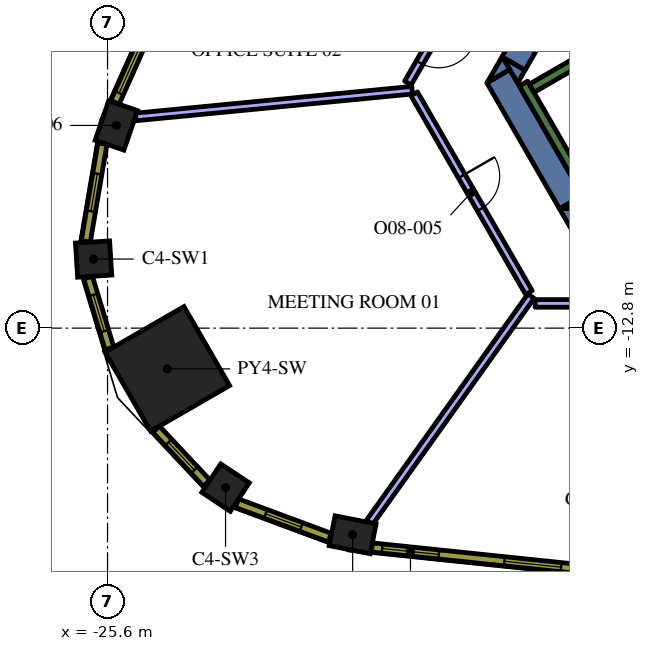
"""IFC4 building model, lengths in metres.
Left out: names, types, materials, properties, quantities, classifications, styles, units other than length and angle.
Written with IfcOpenShell. Run it as: python <this file> out.ifc"""

import sys

from ifc_helpers import new_model, si_unit, direction, frame, frame_2d, origin, origin_2d, place, context, subcontext, project, spatial, polyline, rectangle, outline, extrude, element, fill, save


model = new_model("IFC4")
c1 = context("Model", 3, precision=1e-05, world=origin(), true_north=direction((0.0, 1.0)))
c2 = subcontext(c1, "Body", "Model", "MODEL_VIEW")
j1 = project(units=[si_unit("LENGTHUNIT", "METRE"), si_unit("PLANEANGLEUNIT", "RADIAN")], contexts=[c1])
p1 = place(None, origin())
s1 = spatial("IfcSite", under=j1, at=p1, CompositionType="ELEMENT")
p2 = place(p1, origin())
s2 = spatial("IfcBuilding", under=s1, at=p2, CompositionType="ELEMENT")
p3 = place(p2, frame((0.0, 0.0, 235.2)))
s3 = spatial("IfcBuildingStorey", under=s2, at=p3, CompositionType="ELEMENT", Elevation=235.2)
p4 = place(p3, frame((-24.027, -13.872, 0.0), z_axis=(0.0, 0.0, 1.0), x_axis=(-0.866025403784, -0.5, 0.0)))
e1 = element("IfcColumn", 1, at=p4, inside=s3, PredefinedType="COLUMN", context=c2, shape_type="SweptSolid", body=[
    extrude(rectangle(XDim=2.4, YDim=2.4, at=origin_2d()), origin(), (0.0, 0.0, 1.0), 4.2),
])
for number, where, z_axis, x_axis in (
    (2, (-19.15, -18.237, 0.0), (0.0, 0.0, 1.0), (0.981, -0.192, 0.0)),
    (3, (-25.369, -7.466, 0.0), (0.0, 0.0, 1.0), (-0.324, -0.946, 0.0)),
):
    element("IfcColumn", number, at=place(p3, frame(where, z_axis=z_axis, x_axis=x_axis)), inside=s3, PredefinedType="COLUMN", context=c2, shape_type="SweptSolid", body=[
        extrude(rectangle(XDim=1.1, YDim=0.8, at=origin_2d()), origin(), (0.0, 0.0, 1.0), 4.2),
    ])
for number, where, z_axis, x_axis in (
    (4, (-25.967, -10.982, 0.0), (0.0, 0.0, 1.0), (0.062, -0.998, 0.0)),
    (5, (-22.494, -16.997, 0.0), (0.0, 0.0, 1.0), (0.833, -0.553, 0.0)),
):
    element("IfcColumn", number, at=place(p3, frame(where, z_axis=z_axis, x_axis=x_axis)), inside=s3, PredefinedType="COLUMN", context=c2, shape_type="SweptSolid", body=[
        extrude(rectangle(XDim=0.9, YDim=0.9, at=origin_2d()), origin(), (0.0, 0.0, 1.0), 4.2),
    ])
p5 = place(p3, origin())
e6 = element("IfcWall", 6, at=p5, inside=s3, PredefinedType="SOLIDWALL", context=c2, shape_type="SweptSolid", body=[
    extrude(outline(polyline([(-13.712, -9.65), (-13.324, -9.65), (-13.324, -10.322), (-13.712, -9.65)])), origin(), (0.0, 0.0, 1.0), 4.2),
])
p6 = place(p3, frame((-13.402, -9.487, 0.0), z_axis=(0.0, 0.0, 1.0), x_axis=(-0.500020498207, 0.866013568815, 0.0)))
e7 = element("IfcWall", 7, at=p6, inside=s3, PredefinedType="SOLIDWALL", context=c2, shape_type="SweptSolid", body=[
    extrude(rectangle(XDim=3.829, YDim=0.7, at=frame_2d((1.915, 0.0))), origin(), (0.0, 0.0, 1.0), 4.2),
])
e8 = element("IfcWall", 8, at=p5, inside=s3, PredefinedType="SOLIDWALL", context=c2, shape_type="SweptSolid", body=[
    extrude(outline(polyline([(-15.014, -5.995), (-15.611, -6.339), (-15.213, -5.65), (-15.014, -5.995)])), origin(), (0.0, 0.0, 1.0), 4.2),
])
e9 = element("IfcWall", 9, at=p5, inside=s3, PredefinedType="SOLIDWALL", context=c2, shape_type="SweptSolid", body=[
    extrude(outline(polyline([(-12.904, -9.65), (-13.68, -9.65), (-13.098, -9.314), (-12.904, -9.65)])), origin(), (0.0, 0.0, 1.0), 4.2),
])
p7 = place(p3, frame((-13.475, -3.339, 0.0), z_axis=(0.0, 0.0, 1.0), x_axis=(-0.499944726303, -0.866057313716, 0.0)))
e10 = element("IfcWall", 10, at=p7, inside=s3, PredefinedType="SOLIDWALL", context=c2, shape_type="SweptSolid", body=[
    extrude(rectangle(XDim=2.884, YDim=0.7, at=frame_2d((1.442, 0.0))), origin(), (0.0, 0.0, 1.0), 4.2),
])
e11 = element("IfcWall", 11, at=p5, inside=s3, PredefinedType="SOLIDWALL", context=c2, shape_type="SweptSolid", body=[
    extrude(outline(polyline([(-14.809, -6.35), (-15.197, -5.678), (-14.615, -6.014), (-14.809, -6.35)])), origin(), (0.0, 0.0, 1.0), 4.2),
])
p8 = place(p3, frame((-12.84, -9.511, 0.0), z_axis=(0.0, 0.0, 1.0), x_axis=(-0.499997733992, 0.866026712061, 0.0)))
e12 = element("IfcWall", 12, at=p8, inside=s3, PredefinedType="SOLIDWALL", context=c2, shape_type="SweptSolid", body=[
    extrude(rectangle(XDim=3.634, YDim=0.25, at=frame_2d((1.817, 0.0))), origin(), (0.0, 0.0, 1.0), 4.2),
])
p9 = place(p3, frame((-14.44, -6.49, 0.0), z_axis=(0.0, 0.0, 1.0), x_axis=(0.866022966069, 0.500004222222, 0.0)))
e13 = element("IfcWall", 13, at=p9, inside=s3, PredefinedType="SOLIDWALL", context=c2, shape_type="SweptSolid", body=[
    extrude(rectangle(XDim=6.8, YDim=0.25, at=frame_2d((3.4, 0.0))), origin(), (0.0, 0.0, 1.0), 4.2),
])
p10 = place(p3, frame((-17.586, -6.54, 0.0), z_axis=(0.0, 0.0, 1.0), x_axis=(-0.995357542522, -0.096246363795, 0.0)))
e14 = element("IfcWall", 14, at=p10, inside=s3, PredefinedType="PARTITIONING", context=c2, shape_type="SweptSolid", body=[
    extrude(rectangle(XDim=7.318, YDim=0.2, at=frame_2d((3.659, 0.0))), origin(), (0.0, 0.0, 1.0), 3.45),
])
p11 = place(p3, frame((-16.537, -4.343, 0.0), z_axis=(0.0, 0.0, 1.0), x_axis=(-0.500014285048, -0.866017156151, 0.0)))
e15 = element("IfcWall", 15, at=p11, inside=s3, PredefinedType="PARTITIONING", context=c2, shape_type="SweptSolid", body=[
    extrude(rectangle(XDim=2.317, YDim=0.2, at=frame_2d((1.159, 0.0))), origin(), (0.0, 0.0, 1.0), 3.45),
])
p12 = place(p11, frame((0.7, 0.0, 0.0)))
e16 = element("IfcOpeningElement", 16, at=p12, cuts=e15, PredefinedType="OPENING", context=c2, shape_type="SweptSolid", body=[
    extrude(rectangle(XDim=1.0, YDim=2.1, at=frame_2d((0.5, 1.05))), frame((0.0, 0.11, 0.0), z_axis=(0.0, -1.0, 0.0), x_axis=(1.0, 0.0, 0.0)), (0.0, 0.0, 1.0), 0.22),
])
p13 = place(p3, frame((-14.457, -11.96, 0.0), z_axis=(0.0, 0.0, 1.0), x_axis=(-0.581023578026, -0.813886725397, 0.0)))
e17 = element("IfcWall", 17, at=p13, inside=s3, PredefinedType="PARTITIONING", context=c2, shape_type="SweptSolid", body=[
    extrude(rectangle(XDim=7.318, YDim=0.2, at=frame_2d((3.659, 0.0))), origin(), (0.0, 0.0, 1.0), 3.45),
])
p14 = place(p3, frame((-17.531, -6.635, 0.0), z_axis=(0.0, 0.0, 1.0), x_axis=(0.500009459589, -0.866019942219, 0.0)))
e18 = element("IfcWall", 18, at=p14, inside=s3, PredefinedType="PARTITIONING", context=c2, shape_type="SweptSolid", body=[
    extrude(rectangle(XDim=6.038, YDim=0.2, at=frame_2d((3.019, 0.0))), origin(), (0.0, 0.0, 1.0), 3.45),
])
p15 = place(p14, frame((2.5, 0.0, 0.0)))
e19 = element("IfcOpeningElement", 19, at=p15, cuts=e18, PredefinedType="OPENING", context=c2, shape_type="SweptSolid", body=[
    extrude(rectangle(XDim=1.0, YDim=2.1, at=frame_2d((0.5, 1.05))), frame((0.0, 0.11, 0.0), z_axis=(0.0, -1.0, 0.0), x_axis=(1.0, 0.0, 0.0)), (0.0, 0.0, 1.0), 0.22),
])
p16 = place(p3, frame((-14.347, -12.15, 0.0), z_axis=(0.0, 0.0, 1.0), x_axis=(1.0, 0.0, 0.0)))
e20 = element("IfcWall", 20, at=p16, inside=s3, PredefinedType="PARTITIONING", context=c2, shape_type="SweptSolid", body=[
    extrude(rectangle(XDim=9.817, YDim=0.2, at=frame_2d((4.909, 0.0))), origin(), (0.0, 0.0, 1.0), 3.45),
])
p17 = place(p16, frame((4.4, 0.0, 0.0)))
e21 = element("IfcOpeningElement", 21, at=p17, cuts=e20, PredefinedType="OPENING", context=c2, shape_type="SweptSolid", body=[
    extrude(rectangle(XDim=1.0, YDim=2.1, at=frame_2d((0.5, 1.05))), frame((0.0, 0.11, 0.0), z_axis=(0.0, -1.0, 0.0), x_axis=(1.0, 0.0, 0.0)), (0.0, 0.0, 1.0), 0.22),
])
p18 = place(p3, frame((-18.644, -18.571, 0.0), z_axis=(0.0, 0.0, 1.0), x_axis=(0.994621961215, -0.103571976272, 0.0)))
e22 = element("IfcWall", 22, at=p18, inside=s3, PredefinedType="SOLIDWALL", context=c2, shape_type="SweptSolid", body=[
    extrude(rectangle(XDim=5.311, YDim=0.24, at=frame_2d((2.655, 0.0))), origin(), (0.0, 0.0, 1.0), 3.95),
])
p19 = place(p18, frame((0.271, 0.0, 0.9)))
e23 = element("IfcOpeningElement", 23, at=p19, cuts=e22, PredefinedType="OPENING", context=c2, shape_type="SweptSolid", body=[
    extrude(rectangle(XDim=1.5, YDim=2.55, at=frame_2d((0.75, 1.275))), frame((0.0, 0.13, 0.0), z_axis=(0.0, -1.0, 0.0), x_axis=(1.0, 0.0, 0.0)), (0.0, 0.0, 1.0), 0.26),
])
p20 = place(p18, frame((3.504, 0.0, 0.9)))
e24 = element("IfcOpeningElement", 24, at=p20, cuts=e22, PredefinedType="OPENING", context=c2, shape_type="SweptSolid", body=[
    extrude(rectangle(XDim=1.5, YDim=2.55, at=frame_2d((0.75, 1.275))), frame((0.0, 0.13, 0.0), z_axis=(0.0, -1.0, 0.0), x_axis=(1.0, 0.0, 0.0)), (0.0, 0.0, 1.0), 0.26),
])
p21 = place(p3, frame((-23.24, -2.011, 0.0), z_axis=(0.0, 0.0, 1.0), x_axis=(-0.407579651789, -0.913169659728, 0.0)))
e25 = element("IfcWall", 25, at=p21, inside=s3, PredefinedType="SOLIDWALL", context=c2, shape_type="SweptSolid", body=[
    extrude(rectangle(XDim=5.311, YDim=0.24, at=frame_2d((2.655, 0.0))), origin(), (0.0, 0.0, 1.0), 3.95),
])
p22 = place(p21, frame((0.306, 0.0, 0.9)))
e26 = element("IfcOpeningElement", 26, at=p22, cuts=e25, PredefinedType="OPENING", context=c2, shape_type="SweptSolid", body=[
    extrude(rectangle(XDim=1.5, YDim=2.55, at=frame_2d((0.75, 1.275))), frame((0.0, 0.13, 0.0), z_axis=(0.0, -1.0, 0.0), x_axis=(1.0, 0.0, 0.0)), (0.0, 0.0, 1.0), 0.26),
])
p23 = place(p21, frame((3.539, 0.0, 0.9)))
e27 = element("IfcOpeningElement", 27, at=p23, cuts=e25, PredefinedType="OPENING", context=c2, shape_type="SweptSolid", body=[
    extrude(rectangle(XDim=1.5, YDim=2.55, at=frame_2d((0.75, 1.275))), frame((0.0, 0.13, 0.0), z_axis=(0.0, -1.0, 0.0), x_axis=(1.0, 0.0, 0.0)), (0.0, 0.0, 1.0), 0.26),
])
p24 = place(p3, frame((-25.734, -7.945, 0.0), z_axis=(0.0, 0.0, 1.0), x_axis=(-0.167660055546, -0.985844869021, 0.0)))
e28 = element("IfcWall", 28, at=p24, inside=s3, PredefinedType="SOLIDWALL", context=c2, shape_type="SweptSolid", body=[
    extrude(rectangle(XDim=2.609, YDim=0.24, at=frame_2d((1.305, 0.0))), origin(), (0.0, 0.0, 1.0), 3.95),
])
p25 = place(p24, frame((0.805, 0.0, 0.9)))
e29 = element("IfcOpeningElement", 29, at=p25, cuts=e28, PredefinedType="OPENING", context=c2, shape_type="SweptSolid", body=[
    extrude(rectangle(XDim=1.0, YDim=2.55, at=frame_2d((0.5, 1.275))), frame((0.0, 0.13, 0.0), z_axis=(0.0, -1.0, 0.0), x_axis=(1.0, 0.0, 0.0)), (0.0, 0.0, 1.0), 0.26),
])
p26 = place(p3, frame((-26.112, -11.469, 0.0), z_axis=(0.0, 0.0, 1.0), x_axis=(0.288727209095, -0.957411405159, 0.0)))
e30 = element("IfcWall", 30, at=p26, inside=s3, PredefinedType="SOLIDWALL", context=c2, shape_type="SweptSolid", body=[
    extrude(rectangle(XDim=1.948, YDim=0.24, at=frame_2d((0.974, 0.0))), origin(), (0.0, 0.0, 1.0), 3.95),
])
p27 = place(p26, frame((0.474, 0.0, 0.9)))
e31 = element("IfcOpeningElement", 31, at=p27, cuts=e30, PredefinedType="OPENING", context=c2, shape_type="SweptSolid", body=[
    extrude(rectangle(XDim=1.0, YDim=2.55, at=frame_2d((0.5, 1.275))), frame((0.0, 0.13, 0.0), z_axis=(0.0, -1.0, 0.0), x_axis=(1.0, 0.0, 0.0)), (0.0, 0.0, 1.0), 0.26),
])
p28 = place(p3, frame((-24.323, -15.459, 0.0), z_axis=(0.0, 0.0, 1.0), x_axis=(0.684770274166, -0.728758994194, 0.0)))
e32 = element("IfcWall", 32, at=p28, inside=s3, PredefinedType="SOLIDWALL", context=c2, shape_type="SweptSolid", body=[
    extrude(rectangle(XDim=1.948, YDim=0.24, at=frame_2d((0.974, 0.0))), origin(), (0.0, 0.0, 1.0), 3.95),
])
p29 = place(p28, frame((0.474, 0.0, 0.9)))
e33 = element("IfcOpeningElement", 33, at=p29, cuts=e32, PredefinedType="OPENING", context=c2, shape_type="SweptSolid", body=[
    extrude(rectangle(XDim=1.0, YDim=2.55, at=frame_2d((0.5, 1.275))), frame((0.0, 0.13, 0.0), z_axis=(0.0, -1.0, 0.0), x_axis=(1.0, 0.0, 0.0)), (0.0, 0.0, 1.0), 0.26),
])
p30 = place(p3, frame((-22.194, -17.406, 0.0), z_axis=(0.0, 0.0, 1.0), x_axis=(0.937569171184, -0.347798863203, 0.0)))
e34 = element("IfcWall", 34, at=p30, inside=s3, PredefinedType="SOLIDWALL", context=c2, shape_type="SweptSolid", body=[
    extrude(rectangle(XDim=2.609, YDim=0.24, at=frame_2d((1.305, 0.0))), origin(), (0.0, 0.0, 1.0), 3.95),
])
p31 = place(p30, frame((0.805, 0.0, 0.9)))
e35 = element("IfcOpeningElement", 35, at=p31, cuts=e34, PredefinedType="OPENING", context=c2, shape_type="SweptSolid", body=[
    extrude(rectangle(XDim=1.0, YDim=2.55, at=frame_2d((0.5, 1.275))), frame((0.0, 0.13, 0.0), z_axis=(0.0, -1.0, 0.0), x_axis=(1.0, 0.0, 0.0)), (0.0, 0.0, 1.0), 0.26),
])
p32 = place(p12, origin())
e36 = element("IfcDoor", 36, at=p32, inside=s3, OperationType="SINGLE_SWING_RIGHT", PredefinedType="DOOR", context=c2, shape_type="SweptSolid", body=[
    extrude(rectangle(XDim=1.0, YDim=2.1, at=frame_2d((0.5, 1.05))), frame((0.0, 0.025, 0.0), z_axis=(0.0, -1.0, 0.0), x_axis=(1.0, 0.0, 0.0)), (0.0, 0.0, 1.0), 0.05),
])
fill(e16, e36)
p33 = place(p15, origin())
e37 = element("IfcDoor", 37, at=p33, inside=s3, OperationType="SINGLE_SWING_LEFT", PredefinedType="DOOR", context=c2, shape_type="SweptSolid", body=[
    extrude(rectangle(XDim=1.0, YDim=2.1, at=frame_2d((0.5, 1.05))), frame((0.0, 0.025, 0.0), z_axis=(0.0, -1.0, 0.0), x_axis=(1.0, 0.0, 0.0)), (0.0, 0.0, 1.0), 0.05),
])
fill(e19, e37)
p34 = place(p19, origin())
e38 = element("IfcWindow", 38, at=p34, inside=s3, PartitioningType="SINGLE_PANEL", PredefinedType="WINDOW", context=c2, shape_type="SweptSolid", body=[
    extrude(rectangle(XDim=1.5, YDim=2.55, at=frame_2d((0.75, 1.275))), frame((0.0, 0.04, 0.0), z_axis=(0.0, -1.0, 0.0), x_axis=(1.0, 0.0, 0.0)), (0.0, 0.0, 1.0), 0.06),
])
fill(e23, e38)
p35 = place(p20, origin())
e39 = element("IfcWindow", 39, at=p35, inside=s3, PartitioningType="SINGLE_PANEL", PredefinedType="WINDOW", context=c2, shape_type="SweptSolid", body=[
    extrude(rectangle(XDim=1.5, YDim=2.55, at=frame_2d((0.75, 1.275))), frame((0.0, 0.04, 0.0), z_axis=(0.0, -1.0, 0.0), x_axis=(1.0, 0.0, 0.0)), (0.0, 0.0, 1.0), 0.06),
])
fill(e24, e39)
p36 = place(p23, origin())
e40 = element("IfcWindow", 40, at=p36, inside=s3, PartitioningType="SINGLE_PANEL", PredefinedType="WINDOW", context=c2, shape_type="SweptSolid", body=[
    extrude(rectangle(XDim=1.5, YDim=2.55, at=frame_2d((0.75, 1.275))), frame((0.0, 0.04, 0.0), z_axis=(0.0, -1.0, 0.0), x_axis=(1.0, 0.0, 0.0)), (0.0, 0.0, 1.0), 0.06),
])
fill(e27, e40)
p37 = place(p25, origin())
e41 = element("IfcWindow", 41, at=p37, inside=s3, PartitioningType="SINGLE_PANEL", PredefinedType="WINDOW", context=c2, shape_type="SweptSolid", body=[
    extrude(rectangle(XDim=1.0, YDim=2.55, at=frame_2d((0.5, 1.275))), frame((0.0, 0.04, 0.0), z_axis=(0.0, -1.0, 0.0), x_axis=(1.0, 0.0, 0.0)), (0.0, 0.0, 1.0), 0.06),
])
fill(e29, e41)
p38 = place(p27, origin())
e42 = element("IfcWindow", 42, at=p38, inside=s3, PartitioningType="SINGLE_PANEL", PredefinedType="WINDOW", context=c2, shape_type="SweptSolid", body=[
    extrude(rectangle(XDim=1.0, YDim=2.55, at=frame_2d((0.5, 1.275))), frame((0.0, 0.04, 0.0), z_axis=(0.0, -1.0, 0.0), x_axis=(1.0, 0.0, 0.0)), (0.0, 0.0, 1.0), 0.06),
])
fill(e31, e42)
p39 = place(p29, origin())
e43 = element("IfcWindow", 43, at=p39, inside=s3, PartitioningType="SINGLE_PANEL", PredefinedType="WINDOW", context=c2, shape_type="SweptSolid", body=[
    extrude(rectangle(XDim=1.0, YDim=2.55, at=frame_2d((0.5, 1.275))), frame((0.0, 0.04, 0.0), z_axis=(0.0, -1.0, 0.0), x_axis=(1.0, 0.0, 0.0)), (0.0, 0.0, 1.0), 0.06),
])
fill(e33, e43)
p40 = place(p31, origin())
e44 = element("IfcWindow", 44, at=p40, inside=s3, PartitioningType="SINGLE_PANEL", PredefinedType="WINDOW", context=c2, shape_type="SweptSolid", body=[
    extrude(rectangle(XDim=1.0, YDim=2.55, at=frame_2d((0.5, 1.275))), frame((0.0, 0.04, 0.0), z_axis=(0.0, -1.0, 0.0), x_axis=(1.0, 0.0, 0.0)), (0.0, 0.0, 1.0), 0.06),
])
fill(e35, e44)
save(model, sys.argv[1])
